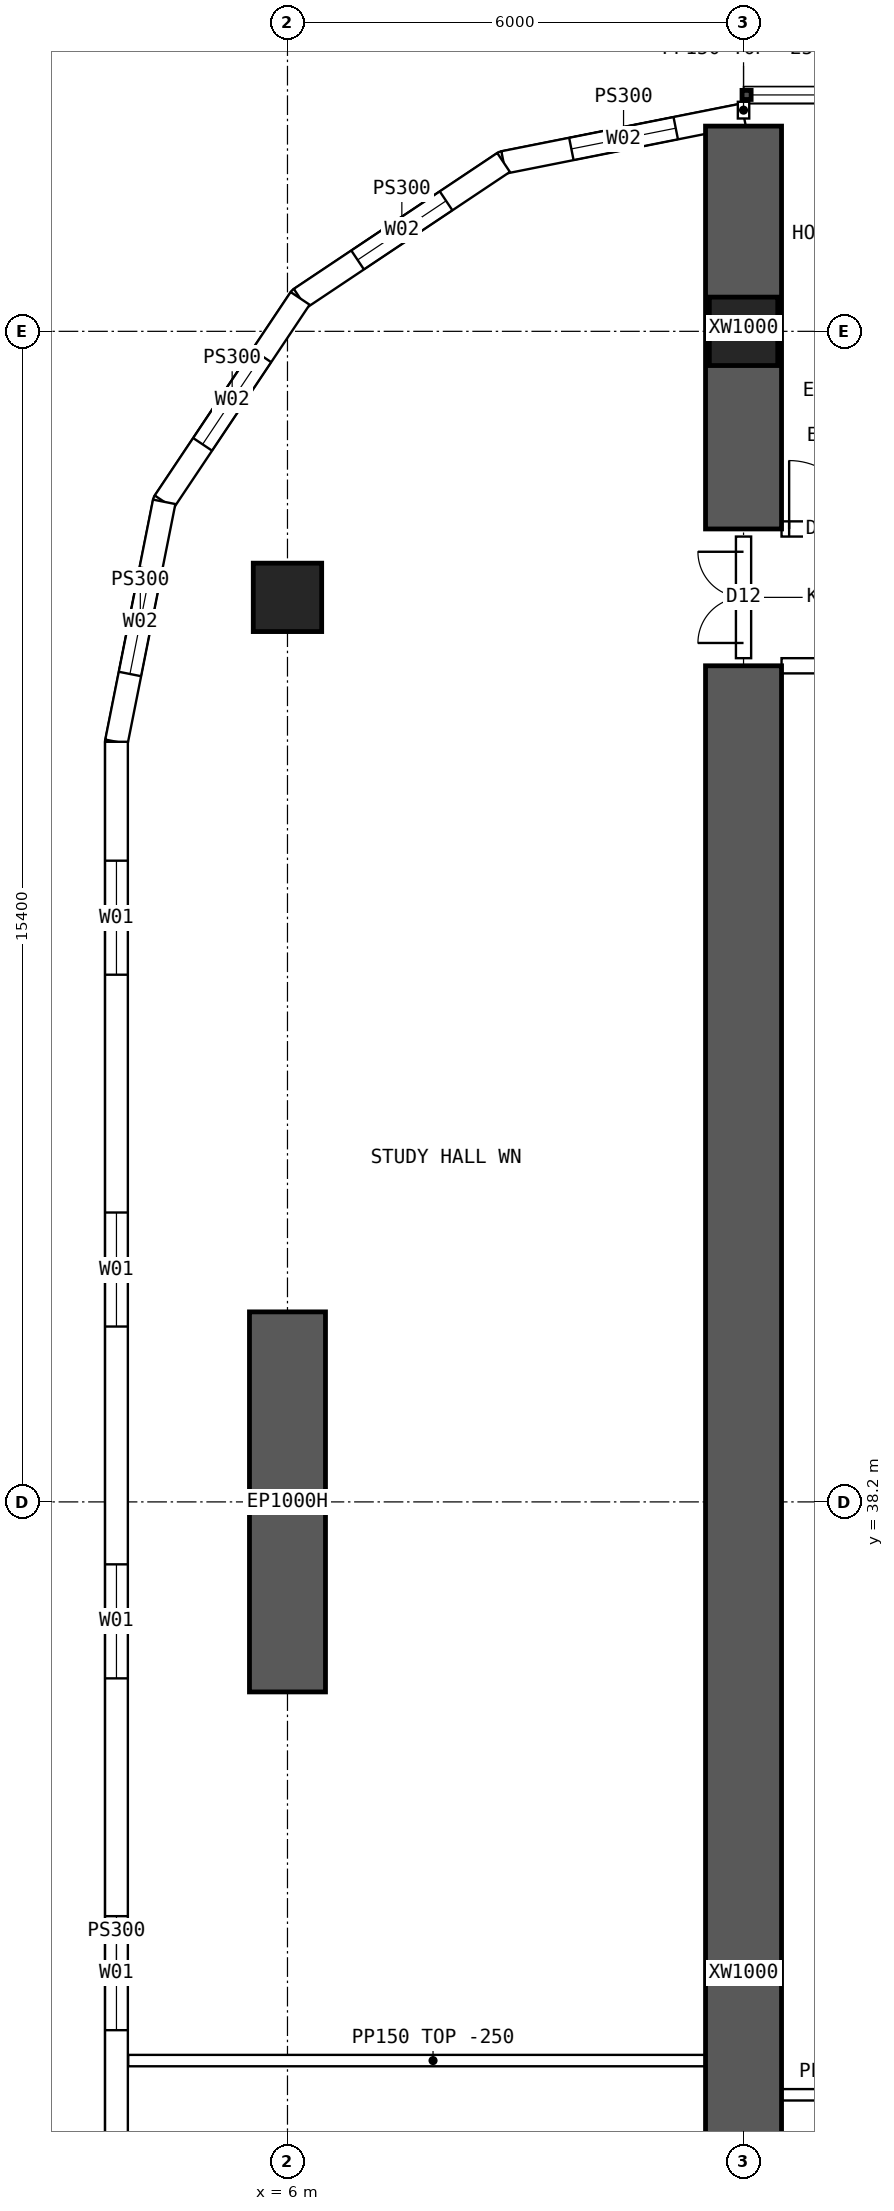
"""IFC4 building model, lengths in metres.
Left out: names, types, materials, properties, quantities, classifications, styles, units other than length and angle.
Written with IfcOpenShell. Run it as: python <this file> out.ifc"""

import sys

from ifc_helpers import new_model, si_unit, direction, frame, frame_2d, origin, origin_2d, place, context, subcontext, project, spatial, polyline, rectangle, hollow_rectangle, outline, extrude, element, fill, save


model = new_model("IFC4")
c1 = context("Model", 3, precision=1e-05, world=origin(), true_north=direction((0.0, 1.0)))
c2 = subcontext(c1, "Body", "Model", "MODEL_VIEW")
j1 = project(units=[si_unit("LENGTHUNIT", "METRE"), si_unit("PLANEANGLEUNIT", "RADIAN")], contexts=[c1])
p1 = place(None, origin())
s1 = spatial("IfcSite", under=j1, at=p1, CompositionType="ELEMENT")
p2 = place(p1, origin())
s2 = spatial("IfcBuilding", under=s1, at=p2, CompositionType="ELEMENT")
p3 = place(p2, frame((0.0, 0.0, 31.45)))
s3 = spatial("IfcBuildingStorey", under=s2, at=p3, CompositionType="ELEMENT", Elevation=31.45)
for number, where, z_axis, x_axis in (
    (1, (12.0, 53.6, 0.0), (0.0, 0.0, 1.0), (1.0, 0.0, 0.0)),
    (2, (6.0, 50.1, 0.0), (0.0, 0.0, 1.0), (1.0, 0.0, 0.0)),
):
    element("IfcColumn", number, at=place(p3, frame(where, z_axis=z_axis, x_axis=x_axis)), inside=s3, PredefinedType="COLUMN", context=c2, shape_type="SweptSolid", body=[
        extrude(hollow_rectangle(XDim=0.9, YDim=0.9, WallThickness=0.09, at=origin_2d()), origin(), (0.0, 0.0, 1.0), 3.75),
    ])
p4 = place(p3, frame((6.0, 35.7, 0.0), z_axis=(0.0, 0.0, 1.0), x_axis=(0.0, 1.0, 0.0)))
e3 = element("IfcWall", 3, at=p4, inside=s3, PredefinedType="SHEAR", context=c2, shape_type="SweptSolid", body=[
    extrude(rectangle(XDim=5.0, YDim=1.0, at=frame_2d((2.5, 0.0))), origin(), (0.0, 0.0, 1.0), 3.75),
])
p5 = place(p3, frame((12.0, 51.0, 0.0), z_axis=(0.0, 0.0, 1.0), x_axis=(0.0, 1.0, 0.0)))
e4 = element("IfcWall", 4, at=p5, inside=s3, PredefinedType="SHEAR", context=c2, shape_type="SweptSolid", body=[
    extrude(rectangle(XDim=5.3, YDim=1.0, at=frame_2d((2.65, 0.0))), origin(), (0.0, 0.0, 1.0), 3.75),
])
p6 = place(p3, frame((12.0, 14.8, 0.0), z_axis=(0.0, 0.0, 1.0), x_axis=(0.0, 1.0, 0.0)))
e5 = element("IfcWall", 5, at=p6, inside=s3, PredefinedType="SHEAR", context=c2, shape_type="SweptSolid", body=[
    extrude(rectangle(XDim=34.4, YDim=1.0, at=frame_2d((17.2, 0.0))), origin(), (0.0, 0.0, 1.0), 3.75),
])
p7 = place(p3, frame((3.75, 48.2, 0.0), z_axis=(0.0, 0.0, 1.0), x_axis=(0.0, -1.0, 0.0)))
e6 = element("IfcWall", 6, at=p7, inside=s3, PredefinedType="SOLIDWALL", context=c2, shape_type="SweptSolid", body=[
    extrude(outline(polyline([(-0.015, -0.15), (32.415, -0.15), (32.385, 0.15), (0.015, 0.15), (-0.015, -0.15)])), origin(), (0.0, 0.0, 1.0), 3.5),
])
p8 = place(p7, frame((1.564, 0.0, 0.9)))
e7 = element("IfcOpeningElement", 7, at=p8, cuts=e6, PredefinedType="OPENING", context=c2, shape_type="SweptSolid", body=[
    extrude(rectangle(XDim=1.5, YDim=2.0, at=frame_2d((0.75, 1.0))), frame((0.0, 0.16, 0.0), z_axis=(0.0, -1.0, 0.0), x_axis=(1.0, 0.0, 0.0)), (0.0, 0.0, 1.0), 0.32),
])
p9 = place(p7, frame((6.193, 0.0, 0.9)))
e8 = element("IfcOpeningElement", 8, at=p9, cuts=e6, PredefinedType="OPENING", context=c2, shape_type="SweptSolid", body=[
    extrude(rectangle(XDim=1.5, YDim=2.0, at=frame_2d((0.75, 1.0))), frame((0.0, 0.16, 0.0), z_axis=(0.0, -1.0, 0.0), x_axis=(1.0, 0.0, 0.0)), (0.0, 0.0, 1.0), 0.32),
])
p10 = place(p7, frame((10.822, 0.0, 0.9)))
e9 = element("IfcOpeningElement", 9, at=p10, cuts=e6, PredefinedType="OPENING", context=c2, shape_type="SweptSolid", body=[
    extrude(rectangle(XDim=1.5, YDim=2.0, at=frame_2d((0.75, 1.0))), frame((0.0, 0.16, 0.0), z_axis=(0.0, -1.0, 0.0), x_axis=(1.0, 0.0, 0.0)), (0.0, 0.0, 1.0), 0.32),
])
p11 = place(p7, frame((15.45, 0.0, 0.9)))
e10 = element("IfcOpeningElement", 10, at=p11, cuts=e6, PredefinedType="OPENING", context=c2, shape_type="SweptSolid", body=[
    extrude(rectangle(XDim=1.5, YDim=2.0, at=frame_2d((0.75, 1.0))), frame((0.0, 0.16, 0.0), z_axis=(0.0, -1.0, 0.0), x_axis=(1.0, 0.0, 0.0)), (0.0, 0.0, 1.0), 0.32),
])
p12 = place(p7, frame((20.079, 0.0, 0.9)))
e11 = element("IfcOpeningElement", 11, at=p12, cuts=e6, PredefinedType="OPENING", context=c2, shape_type="SweptSolid", body=[
    extrude(rectangle(XDim=1.5, YDim=2.0, at=frame_2d((0.75, 1.0))), frame((0.0, 0.16, 0.0), z_axis=(0.0, -1.0, 0.0), x_axis=(1.0, 0.0, 0.0)), (0.0, 0.0, 1.0), 0.32),
])
p13 = place(p7, frame((24.707, 0.0, 0.9)))
e12 = element("IfcOpeningElement", 12, at=p13, cuts=e6, PredefinedType="OPENING", context=c2, shape_type="SweptSolid", body=[
    extrude(rectangle(XDim=1.5, YDim=2.0, at=frame_2d((0.75, 1.0))), frame((0.0, 0.16, 0.0), z_axis=(0.0, -1.0, 0.0), x_axis=(1.0, 0.0, 0.0)), (0.0, 0.0, 1.0), 0.32),
])
p14 = place(p7, frame((29.336, 0.0, 0.9)))
e13 = element("IfcOpeningElement", 13, at=p14, cuts=e6, PredefinedType="OPENING", context=c2, shape_type="SweptSolid", body=[
    extrude(rectangle(XDim=1.5, YDim=2.0, at=frame_2d((0.75, 1.0))), frame((0.0, 0.16, 0.0), z_axis=(0.0, -1.0, 0.0), x_axis=(1.0, 0.0, 0.0)), (0.0, 0.0, 1.0), 0.32),
])
p15 = place(p3, frame((12.0, 56.45, 0.0), z_axis=(0.0, 0.0, 1.0), x_axis=(-0.980787251524, -0.195080412259, 0.0)))
e14 = element("IfcWall", 14, at=p15, inside=s3, PredefinedType="SOLIDWALL", context=c2, shape_type="SweptSolid", body=[
    extrude(outline(polyline([(-0.03, -0.15), (3.249, -0.15), (3.189, 0.15), (0.03, 0.15), (-0.03, -0.15)])), origin(), (0.0, 0.0, 1.0), 3.5),
])
p16 = place(p15, frame((0.909, 0.0, 0.9)))
e15 = element("IfcOpeningElement", 15, at=p16, cuts=e14, PredefinedType="OPENING", context=c2, shape_type="SweptSolid", body=[
    extrude(rectangle(XDim=1.4, YDim=1.8, at=frame_2d((0.7, 0.9))), frame((0.0, 0.16, 0.0), z_axis=(0.0, -1.0, 0.0), x_axis=(1.0, 0.0, 0.0)), (0.0, 0.0, 1.0), 0.32),
])
p17 = place(p3, frame((8.843, 55.822, 0.0), z_axis=(0.0, 0.0, 1.0), x_axis=(-0.831478105043, -0.555557522525, 0.0)))
e16 = element("IfcWall", 16, at=p17, inside=s3, PredefinedType="SOLIDWALL", context=c2, shape_type="SweptSolid", body=[
    extrude(outline(polyline([(-0.03, -0.15), (3.249, -0.15), (3.189, 0.15), (0.03, 0.15), (-0.03, -0.15)])), origin(), (0.0, 0.0, 1.0), 3.5),
])
p18 = place(p17, frame((0.909, 0.0, 0.9)))
e17 = element("IfcOpeningElement", 17, at=p18, cuts=e16, PredefinedType="OPENING", context=c2, shape_type="SweptSolid", body=[
    extrude(rectangle(XDim=1.4, YDim=1.8, at=frame_2d((0.7, 0.9))), frame((0.0, 0.16, 0.0), z_axis=(0.0, -1.0, 0.0), x_axis=(1.0, 0.0, 0.0)), (0.0, 0.0, 1.0), 0.32),
])
p19 = place(p3, frame((6.167, 54.034, 0.0), z_axis=(0.0, 0.0, 1.0), x_axis=(-0.555609954424, -0.831443069936, 0.0)))
e18 = element("IfcWall", 18, at=p19, inside=s3, PredefinedType="SOLIDWALL", context=c2, shape_type="SweptSolid", body=[
    extrude(outline(polyline([(-0.03, -0.15), (3.249, -0.15), (3.189, 0.15), (0.03, 0.15), (-0.03, -0.15)])), origin(), (0.0, 0.0, 1.0), 3.5),
])
p20 = place(p19, frame((0.909, 0.0, 0.9)))
e19 = element("IfcOpeningElement", 19, at=p20, cuts=e18, PredefinedType="OPENING", context=c2, shape_type="SweptSolid", body=[
    extrude(rectangle(XDim=1.4, YDim=1.8, at=frame_2d((0.7, 0.9))), frame((0.0, 0.16, 0.0), z_axis=(0.0, -1.0, 0.0), x_axis=(1.0, 0.0, 0.0)), (0.0, 0.0, 1.0), 0.32),
])
p21 = place(p3, frame((4.378, 51.357, 0.0), z_axis=(0.0, 0.0, 1.0), x_axis=(-0.195065901187, -0.980790137692, 0.0)))
e20 = element("IfcWall", 20, at=p21, inside=s3, PredefinedType="SOLIDWALL", context=c2, shape_type="SweptSolid", body=[
    extrude(outline(polyline([(-0.03, -0.15), (3.234, -0.15), (3.204, 0.15), (0.03, 0.15), (-0.03, -0.15)])), origin(), (0.0, 0.0, 1.0), 3.5),
])
p22 = place(p21, frame((0.909, 0.0, 0.9)))
e21 = element("IfcOpeningElement", 21, at=p22, cuts=e20, PredefinedType="OPENING", context=c2, shape_type="SweptSolid", body=[
    extrude(rectangle(XDim=1.4, YDim=1.8, at=frame_2d((0.7, 0.9))), frame((0.0, 0.16, 0.0), z_axis=(0.0, -1.0, 0.0), x_axis=(1.0, 0.0, 0.0)), (0.0, 0.0, 1.0), 0.32),
])
p23 = place(p3, frame((12.5, 51.0, 0.0), z_axis=(0.0, 0.0, 1.0), x_axis=(1.0, 0.0, 0.0)))
e22 = element("IfcWall", 22, at=p23, inside=s3, PredefinedType="SOLIDWALL", context=c2, shape_type="SweptSolid", body=[
    extrude(outline(polyline([(0.0, 0.0), (5.0, 0.0), (5.0, 3.1), (0.0, 3.1), (0.0, 0.0)])), frame((0.0, 0.1, 0.0), z_axis=(0.0, -1.0, 0.0), x_axis=(1.0, 0.0, 0.0)), (0.0, 0.0, 1.0), 0.2),
])
p24 = place(p23, frame((0.1, 0.0, 0.0)))
e23 = element("IfcOpeningElement", 23, at=p24, cuts=e22, PredefinedType="OPENING", context=c2, shape_type="SweptSolid", body=[
    extrude(rectangle(XDim=0.9, YDim=2.1, at=frame_2d((0.45, 1.05))), frame((0.0, 0.11, 0.0), z_axis=(0.0, -1.0, 0.0), x_axis=(1.0, 0.0, 0.0)), (0.0, 0.0, 1.0), 0.22),
])
p25 = place(p23, frame((4.0, 0.0, 0.0)))
e24 = element("IfcOpeningElement", 24, at=p25, cuts=e22, PredefinedType="OPENING", context=c2, shape_type="SweptSolid", body=[
    extrude(rectangle(XDim=0.9, YDim=2.1, at=frame_2d((0.45, 1.05))), frame((0.0, 0.11, 0.0), z_axis=(0.0, -1.0, 0.0), x_axis=(1.0, 0.0, 0.0)), (0.0, 0.0, 1.0), 0.22),
])
p26 = place(p3, frame((12.5, 49.2, 0.0), z_axis=(0.0, 0.0, 1.0), x_axis=(1.0, 0.0, 0.0)))
e25 = element("IfcWall", 25, at=p26, inside=s3, PredefinedType="SOLIDWALL", context=c2, shape_type="SweptSolid", body=[
    extrude(rectangle(XDim=5.0, YDim=0.2, at=frame_2d((2.5, 0.0))), origin(), (0.0, 0.0, 1.0), 3.5),
])
p27 = place(p26, frame((3.3, 0.0, 0.0)))
e26 = element("IfcOpeningElement", 26, at=p27, cuts=e25, PredefinedType="OPENING", context=c2, shape_type="SweptSolid", body=[
    extrude(rectangle(XDim=1.6, YDim=2.1, at=frame_2d((0.8, 1.05))), frame((0.0, 0.11, 0.0), z_axis=(0.0, -1.0, 0.0), x_axis=(1.0, 0.0, 0.0)), (0.0, 0.0, 1.0), 0.22),
])
p28 = place(p3, frame((12.0, 30.4, 0.0), z_axis=(0.0, 0.0, 1.0), x_axis=(1.0, 0.0, 0.0)))
e27 = element("IfcWall", 27, at=p28, inside=s3, PredefinedType="PARTITIONING", context=c2, shape_type="SweptSolid", body=[
    extrude(rectangle(XDim=3.6, YDim=0.15, at=frame_2d((1.8, 0.0))), origin(), (0.0, 0.0, 1.0), 3.5),
])
p29 = place(p3, frame((3.905, 30.85, 0.0), z_axis=(0.0, 0.0, 1.0), x_axis=(1.0, 0.0, 0.0)))
e28 = element("IfcWall", 28, at=p29, inside=s3, PredefinedType="PARTITIONING", context=c2, shape_type="SweptSolid", body=[
    extrude(outline(polyline([(0.0, 0.0), (8.02, 0.0), (8.02, 3.5), (2.397, 3.5), (2.395, 3.05), (1.797, 3.05), (1.795, 3.5), (0.0, 3.5), (0.0, 0.0)])), frame((0.0, 0.075, 0.0), z_axis=(0.0, -1.0, 0.0), x_axis=(1.0, 0.0, 0.0)), (0.0, 0.0, 1.0), 0.15),
])
p30 = place(p3, frame((12.0, 49.3, 0.0), z_axis=(0.0, 0.0, 1.0), x_axis=(0.0, 1.0, 0.0)))
e29 = element("IfcWall", 29, at=p30, inside=s3, PredefinedType="SOLIDWALL", context=c2, shape_type="SweptSolid", body=[
    extrude(outline(polyline([(0.0, 0.0), (1.6, 0.0), (1.6, 3.05), (0.0, 3.05), (0.0, 0.0)])), frame((0.0, 0.1, 0.0), z_axis=(0.0, -1.0, 0.0), x_axis=(1.0, 0.0, 0.0)), (0.0, 0.0, 1.0), 0.2),
])
p31 = place(p30, frame((0.2, 0.0, 0.0)))
e30 = element("IfcOpeningElement", 30, at=p31, cuts=e29, PredefinedType="OPENING", context=c2, shape_type="SweptSolid", body=[
    extrude(rectangle(XDim=1.2, YDim=2.1, at=frame_2d((0.6, 1.05))), frame((0.0, 0.11, 0.0), z_axis=(0.0, -1.0, 0.0), x_axis=(1.0, 0.0, 0.0)), (0.0, 0.0, 1.0), 0.22),
])
p32 = place(p3, frame((12.0, 56.4, 0.0), z_axis=(0.0, 0.0, 1.0), x_axis=(0.0, 1.0, 0.0)))
e31 = element("IfcWall", 31, at=p32, inside=s3, PredefinedType="PARTITIONING", context=c2, shape_type="SweptSolid", body=[
    extrude(rectangle(XDim=0.22, YDim=0.15, at=frame_2d((0.11, 0.0))), origin(), (0.0, 0.0, 1.0), 3.5),
])
p33 = place(p8, origin())
e32 = element("IfcWindow", 32, at=p33, inside=s3, PartitioningType="SINGLE_PANEL", PredefinedType="WINDOW", context=c2, shape_type="SweptSolid", body=[
    extrude(rectangle(XDim=1.5, YDim=2.0, at=frame_2d((0.75, 1.0))), frame((0.0, 0.03, 0.0), z_axis=(0.0, -1.0, 0.0), x_axis=(1.0, 0.0, 0.0)), (0.0, 0.0, 1.0), 0.06),
])
fill(e7, e32)
p34 = place(p9, origin())
e33 = element("IfcWindow", 33, at=p34, inside=s3, PartitioningType="SINGLE_PANEL", PredefinedType="WINDOW", context=c2, shape_type="SweptSolid", body=[
    extrude(rectangle(XDim=1.5, YDim=2.0, at=frame_2d((0.75, 1.0))), frame((0.0, 0.03, 0.0), z_axis=(0.0, -1.0, 0.0), x_axis=(1.0, 0.0, 0.0)), (0.0, 0.0, 1.0), 0.06),
])
fill(e8, e33)
p35 = place(p10, origin())
e34 = element("IfcWindow", 34, at=p35, inside=s3, PartitioningType="SINGLE_PANEL", PredefinedType="WINDOW", context=c2, shape_type="SweptSolid", body=[
    extrude(rectangle(XDim=1.5, YDim=2.0, at=frame_2d((0.75, 1.0))), frame((0.0, 0.03, 0.0), z_axis=(0.0, -1.0, 0.0), x_axis=(1.0, 0.0, 0.0)), (0.0, 0.0, 1.0), 0.06),
])
fill(e9, e34)
p36 = place(p11, origin())
e35 = element("IfcWindow", 35, at=p36, inside=s3, PartitioningType="SINGLE_PANEL", PredefinedType="WINDOW", context=c2, shape_type="SweptSolid", body=[
    extrude(rectangle(XDim=1.5, YDim=2.0, at=frame_2d((0.75, 1.0))), frame((0.0, 0.03, 0.0), z_axis=(0.0, -1.0, 0.0), x_axis=(1.0, 0.0, 0.0)), (0.0, 0.0, 1.0), 0.06),
])
fill(e10, e35)
p37 = place(p16, origin())
e36 = element("IfcWindow", 36, at=p37, inside=s3, PartitioningType="SINGLE_PANEL", PredefinedType="WINDOW", context=c2, shape_type="SweptSolid", body=[
    extrude(rectangle(XDim=1.4, YDim=1.8, at=frame_2d((0.7, 0.9))), frame((0.0, 0.03, 0.0), z_axis=(0.0, -1.0, 0.0), x_axis=(1.0, 0.0, 0.0)), (0.0, 0.0, 1.0), 0.06),
])
fill(e15, e36)
p38 = place(p18, origin())
e37 = element("IfcWindow", 37, at=p38, inside=s3, PartitioningType="SINGLE_PANEL", PredefinedType="WINDOW", context=c2, shape_type="SweptSolid", body=[
    extrude(rectangle(XDim=1.4, YDim=1.8, at=frame_2d((0.7, 0.9))), frame((0.0, 0.03, 0.0), z_axis=(0.0, -1.0, 0.0), x_axis=(1.0, 0.0, 0.0)), (0.0, 0.0, 1.0), 0.06),
])
fill(e17, e37)
p39 = place(p20, origin())
e38 = element("IfcWindow", 38, at=p39, inside=s3, PartitioningType="SINGLE_PANEL", PredefinedType="WINDOW", context=c2, shape_type="SweptSolid", body=[
    extrude(rectangle(XDim=1.4, YDim=1.8, at=frame_2d((0.7, 0.9))), frame((0.0, 0.03, 0.0), z_axis=(0.0, -1.0, 0.0), x_axis=(1.0, 0.0, 0.0)), (0.0, 0.0, 1.0), 0.06),
])
fill(e19, e38)
p40 = place(p22, origin())
e39 = element("IfcWindow", 39, at=p40, inside=s3, PartitioningType="SINGLE_PANEL", PredefinedType="WINDOW", context=c2, shape_type="SweptSolid", body=[
    extrude(rectangle(XDim=1.4, YDim=1.8, at=frame_2d((0.7, 0.9))), frame((0.0, 0.03, 0.0), z_axis=(0.0, -1.0, 0.0), x_axis=(1.0, 0.0, 0.0)), (0.0, 0.0, 1.0), 0.06),
])
fill(e21, e39)
p41 = place(p24, origin())
e40 = element("IfcDoor", 40, at=p41, inside=s3, OperationType="SINGLE_SWING_LEFT", PredefinedType="DOOR", context=c2, shape_type="SweptSolid", body=[
    extrude(rectangle(XDim=0.9, YDim=2.1, at=frame_2d((0.45, 1.05))), frame((0.0, 0.025, 0.0), z_axis=(0.0, -1.0, 0.0), x_axis=(1.0, 0.0, 0.0)), (0.0, 0.0, 1.0), 0.05),
])
fill(e23, e40)
p42 = place(p31, origin())
e41 = element("IfcDoor", 41, at=p42, inside=s3, OperationType="DOUBLE_DOOR_SINGLE_SWING", PredefinedType="DOOR", context=c2, shape_type="SweptSolid", body=[
    extrude(rectangle(XDim=1.2, YDim=2.1, at=frame_2d((0.6, 1.05))), frame((0.0, 0.025, 0.0), z_axis=(0.0, -1.0, 0.0), x_axis=(1.0, 0.0, 0.0)), (0.0, 0.0, 1.0), 0.05),
])
fill(e30, e41)
save(model, sys.argv[1])
